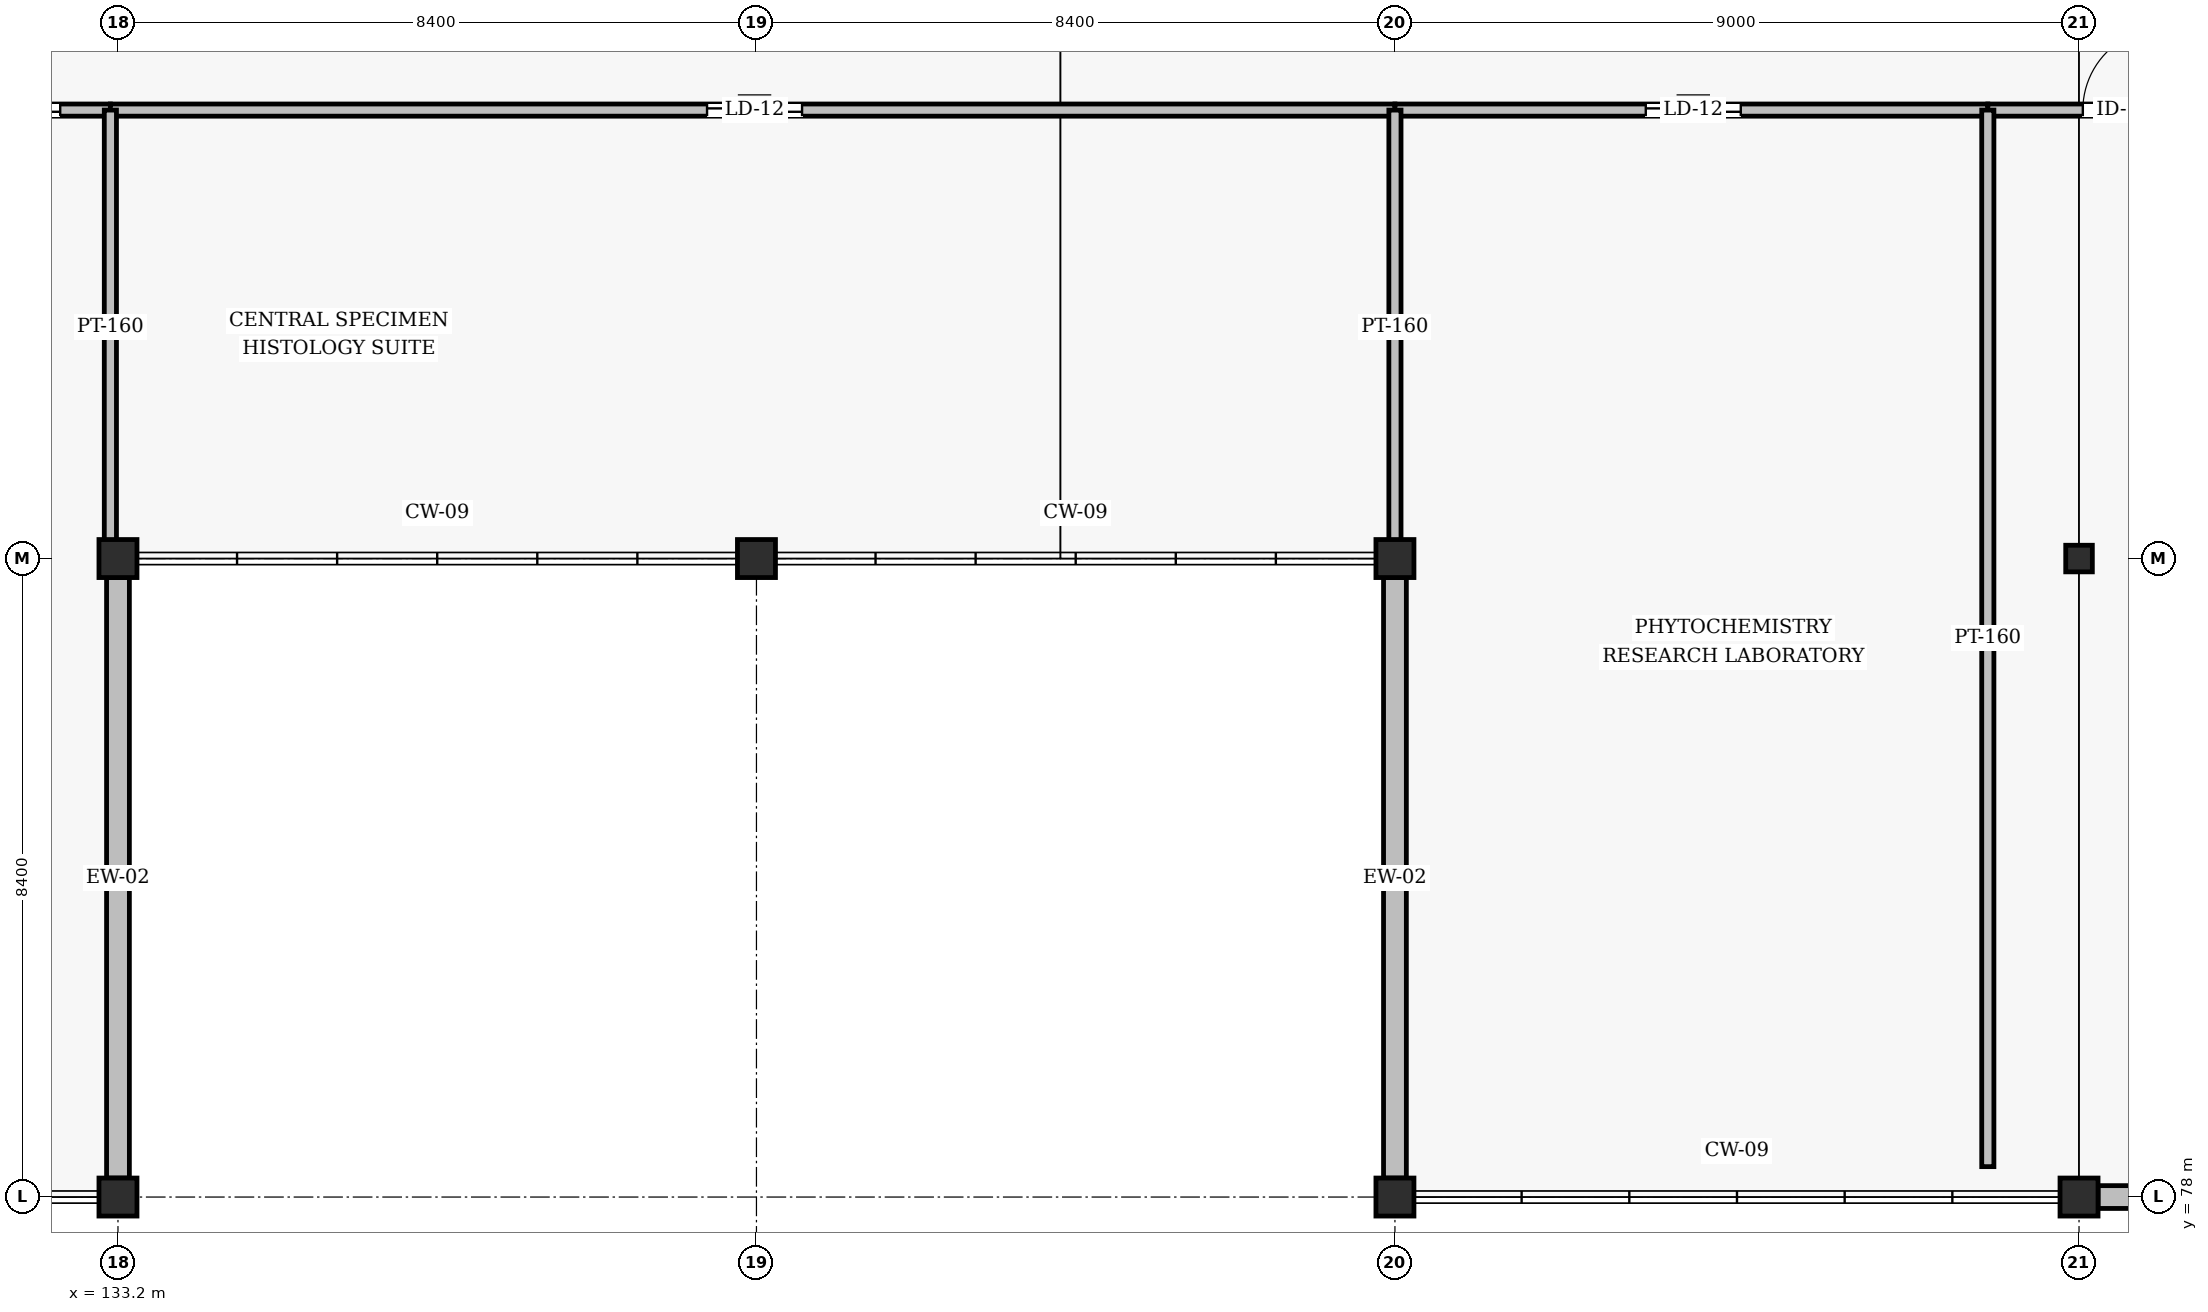
"""IFC4 building model, lengths in metres.
Left out: names, types, materials, properties, quantities, classifications, styles, units other than length and angle.
Written with IfcOpenShell. Run it as: python <this file> out.ifc"""

import sys

from ifc_helpers import new_model, si_unit, direction, frame, frame_2d, origin, origin_2d, place, context, subcontext, project, spatial, rectangle, hollow_rectangle, i_section, extrude, element, fill, save


model = new_model("IFC4")
c1 = context("Model", 3, precision=1e-05, world=origin(), true_north=direction((0.0, 1.0)))
c2 = subcontext(c1, "Body", "Model", "MODEL_VIEW")
j1 = project(units=[si_unit("LENGTHUNIT", "METRE"), si_unit("PLANEANGLEUNIT", "RADIAN")], contexts=[c1])
p1 = place(None, origin())
s1 = spatial("IfcSite", under=j1, at=p1, CompositionType="ELEMENT")
p2 = place(p1, origin())
s2 = spatial("IfcBuilding", under=s1, at=p2, CompositionType="ELEMENT")
p3 = place(p2, frame((0.0, 0.0, 31.8)))
s3 = spatial("IfcBuildingStorey", under=s2, at=p3, CompositionType="ELEMENT", Elevation=31.8)
p4 = place(p3, frame((133.2, 78.0, 0.0), z_axis=(0.0, 0.0, 1.0), x_axis=(1.0, 0.0, 0.0)))
e1 = element("IfcColumn", 1, at=p4, inside=s3, PredefinedType="COLUMN", context=c2, shape_type="SweptSolid", body=[
    extrude(hollow_rectangle(XDim=0.5, YDim=0.5, WallThickness=0.02, InnerFilletRadius=0.02, OuterFilletRadius=0.04, at=origin_2d()), origin(), (0.0, 0.0, 1.0), 3.576),
])
for number, where, z_axis, x_axis in (
    (2, (133.2, 86.4, 0.0), (0.0, 0.0, 1.0), (1.0, 0.0, 0.0)),
    (3, (141.6, 86.4, 0.0), (0.0, 0.0, 1.0), (1.0, 0.0, 0.0)),
):
    element("IfcColumn", number, at=place(p3, frame(where, z_axis=z_axis, x_axis=x_axis)), inside=s3, PredefinedType="COLUMN", context=c2, shape_type="SweptSolid", body=[
        extrude(hollow_rectangle(XDim=0.5, YDim=0.5, WallThickness=0.02, InnerFilletRadius=0.02, OuterFilletRadius=0.04, at=origin_2d()), origin(), (0.0, 0.0, 1.0), 3.6),
    ])
p5 = place(p3, frame((150.0, 78.0, 0.0), z_axis=(0.0, 0.0, 1.0), x_axis=(1.0, 0.0, 0.0)))
e4 = element("IfcColumn", 4, at=p5, inside=s3, PredefinedType="COLUMN", context=c2, shape_type="SweptSolid", body=[
    extrude(hollow_rectangle(XDim=0.5, YDim=0.5, WallThickness=0.02, InnerFilletRadius=0.02, OuterFilletRadius=0.04, at=origin_2d()), origin(), (0.0, 0.0, 1.0), 3.576),
])
p6 = place(p3, frame((150.0, 86.4, 0.0), z_axis=(0.0, 0.0, 1.0), x_axis=(1.0, 0.0, 0.0)))
e5 = element("IfcColumn", 5, at=p6, inside=s3, PredefinedType="COLUMN", context=c2, shape_type="SweptSolid", body=[
    extrude(hollow_rectangle(XDim=0.5, YDim=0.5, WallThickness=0.02, InnerFilletRadius=0.02, OuterFilletRadius=0.04, at=origin_2d()), origin(), (0.0, 0.0, 1.0), 3.6),
])
p7 = place(p3, frame((159.0, 78.0, 0.0), z_axis=(0.0, 0.0, 1.0), x_axis=(1.0, 0.0, 0.0)))
e6 = element("IfcColumn", 6, at=p7, inside=s3, PredefinedType="COLUMN", context=c2, shape_type="SweptSolid", body=[
    extrude(hollow_rectangle(XDim=0.5, YDim=0.5, WallThickness=0.02, InnerFilletRadius=0.02, OuterFilletRadius=0.04, at=origin_2d()), origin(), (0.0, 0.0, 1.0), 3.576),
])
p8 = place(p3, frame((159.0, 86.4, 0.0), z_axis=(0.0, 0.0, 1.0), x_axis=(1.0, 0.0, 0.0)))
e7 = element("IfcColumn", 7, at=p8, inside=s3, PredefinedType="COLUMN", context=c2, shape_type="SweptSolid", body=[
    extrude(i_section(OverallWidth=0.35, OverallDepth=0.35, WebThickness=0.012, FlangeThickness=0.019, FilletRadius=0.02, at=origin_2d()), origin(), (0.0, 0.0, 1.0), 3.6),
])
p9 = place(p3, frame((133.2, 78.25, 0.0), z_axis=(0.0, 0.0, 1.0), x_axis=(0.0, 1.0, 0.0)))
e8 = element("IfcWall", 8, at=p9, inside=s3, PredefinedType="SOLIDWALL", context=c2, shape_type="SweptSolid", body=[
    extrude(rectangle(XDim=7.9, YDim=0.3, at=frame_2d((3.95, 0.0))), origin(), (0.0, 0.0, 1.0), 2.795),
])
p10 = place(p3, frame((150.0, 86.15, 0.0), z_axis=(0.0, 0.0, 1.0), x_axis=(0.0, -1.0, 0.0)))
e9 = element("IfcWall", 9, at=p10, inside=s3, PredefinedType="SOLIDWALL", context=c2, shape_type="SweptSolid", body=[
    extrude(rectangle(XDim=7.9, YDim=0.3, at=frame_2d((3.95, 0.0))), origin(), (0.0, 0.0, 1.0), 2.095),
])
p11 = place(p3, frame((159.25, 78.0, 0.0), z_axis=(0.0, 0.0, 1.0), x_axis=(1.0, 0.0, 0.0)))
e10 = element("IfcWall", 10, at=p11, inside=s3, PredefinedType="SOLIDWALL", context=c2, shape_type="SweptSolid", body=[
    extrude(rectangle(XDim=8.5, YDim=0.3, at=frame_2d((4.25, 0.0))), origin(), (0.0, 0.0, 1.0), 3.295),
])
p12 = place(p11, frame((2.083, 0.0, 0.85)))
e11 = element("IfcOpeningElement", 11, at=p12, cuts=e10, PredefinedType="OPENING", context=c2, shape_type="SweptSolid", body=[
    extrude(rectangle(XDim=1.5, YDim=2.1, at=frame_2d((0.75, 1.05))), frame((0.0, 0.16, 0.0), z_axis=(0.0, -1.0, 0.0), x_axis=(1.0, 0.0, 0.0)), (0.0, 0.0, 1.0), 0.32),
])
p13 = place(p11, frame((4.917, 0.0, 0.85)))
e12 = element("IfcOpeningElement", 12, at=p13, cuts=e10, PredefinedType="OPENING", context=c2, shape_type="SweptSolid", body=[
    extrude(rectangle(XDim=1.5, YDim=2.1, at=frame_2d((0.75, 1.05))), frame((0.0, 0.16, 0.0), z_axis=(0.0, -1.0, 0.0), x_axis=(1.0, 0.0, 0.0)), (0.0, 0.0, 1.0), 0.32),
])
p14 = place(p3, frame((130.6, 92.3, 0.0), z_axis=(0.0, 0.0, 1.0), x_axis=(1.0, 0.0, 0.0)))
e13 = element("IfcWall", 13, at=p14, inside=s3, PredefinedType="PARTITIONING", context=c2, shape_type="SweptSolid", body=[
    extrude(rectangle(XDim=2.5, YDim=0.16, at=frame_2d((1.25, 0.0))), origin(), (0.0, 0.0, 1.0), 3.295),
])
p15 = place(p14, frame((0.7, 0.0, 0.0)))
e14 = element("IfcOpeningElement", 14, at=p15, cuts=e13, PredefinedType="OPENING", context=c2, shape_type="SweptSolid", body=[
    extrude(rectangle(XDim=1.14, YDim=2.12, at=frame_2d((0.57, 1.06))), frame((0.0, 0.09, 0.0), z_axis=(0.0, -1.0, 0.0), x_axis=(1.0, 0.0, 0.0)), (0.0, 0.0, 1.0), 0.18),
])
p16 = place(p3, frame((133.1, 92.3, 0.0), z_axis=(0.0, 0.0, 1.0), x_axis=(1.0, 0.0, 0.0)))
e15 = element("IfcWall", 15, at=p16, inside=s3, PredefinedType="PARTITIONING", context=c2, shape_type="SweptSolid", body=[
    extrude(rectangle(XDim=16.9, YDim=0.16, at=frame_2d((8.45, 0.0))), origin(), (0.0, 0.0, 1.0), 2.795),
])
p17 = place(p16, frame((7.85, 0.0, 0.0)))
e16 = element("IfcOpeningElement", 16, at=p17, cuts=e15, PredefinedType="OPENING", context=c2, shape_type="SweptSolid", body=[
    extrude(rectangle(XDim=1.25, YDim=2.12, at=frame_2d((0.625, 1.06))), frame((0.0, 0.09, 0.0), z_axis=(0.0, -1.0, 0.0), x_axis=(1.0, 0.0, 0.0)), (0.0, 0.0, 1.0), 0.18),
])
p18 = place(p3, frame((150.0, 92.3, 0.0), z_axis=(0.0, 0.0, 1.0), x_axis=(1.0, 0.0, 0.0)))
e17 = element("IfcWall", 17, at=p18, inside=s3, PredefinedType="PARTITIONING", context=c2, shape_type="SweptSolid", body=[
    extrude(rectangle(XDim=7.8, YDim=0.16, at=frame_2d((3.9, 0.0))), origin(), (0.0, 0.0, 1.0), 3.295),
])
p19 = place(p18, frame((3.3, 0.0, 0.0)))
e18 = element("IfcOpeningElement", 18, at=p19, cuts=e17, PredefinedType="OPENING", context=c2, shape_type="SweptSolid", body=[
    extrude(rectangle(XDim=1.25, YDim=2.12, at=frame_2d((0.625, 1.06))), frame((0.0, 0.09, 0.0), z_axis=(0.0, -1.0, 0.0), x_axis=(1.0, 0.0, 0.0)), (0.0, 0.0, 1.0), 0.18),
])
p20 = place(p3, frame((157.8, 92.3, 0.0), z_axis=(0.0, 0.0, 1.0), x_axis=(1.0, 0.0, 0.0)))
e19 = element("IfcWall", 19, at=p20, inside=s3, PredefinedType="PARTITIONING", context=c2, shape_type="SweptSolid", body=[
    extrude(rectangle(XDim=3.6, YDim=0.16, at=frame_2d((1.8, 0.0))), origin(), (0.0, 0.0, 1.0), 2.795),
])
p21 = place(p20, frame((1.25, 0.0, 0.0)))
e20 = element("IfcOpeningElement", 20, at=p21, cuts=e19, PredefinedType="OPENING", context=c2, shape_type="SweptSolid", body=[
    extrude(rectangle(XDim=1.08, YDim=2.08, at=frame_2d((0.54, 1.04))), frame((0.0, 0.09, 0.0), z_axis=(0.0, -1.0, 0.0), x_axis=(1.0, 0.0, 0.0)), (0.0, 0.0, 1.0), 0.18),
])
for number, where, z_axis, x_axis in (
    (21, (133.1, 86.6, 0.0), (0.0, 0.0, 1.0), (0.0, 1.0, 0.0)),
    (22, (150.0, 86.6, 0.0), (0.0, 0.0, 1.0), (0.0, 1.0, 0.0)),
):
    element("IfcWall", number, at=place(p3, frame(where, z_axis=z_axis, x_axis=x_axis)), inside=s3, PredefinedType="PARTITIONING", context=c2, shape_type="SweptSolid", body=[
        extrude(rectangle(XDim=5.7, YDim=0.16, at=frame_2d((2.85, 0.0))), origin(), (0.0, 0.0, 1.0), 2.795),
    ])
p22 = place(p3, frame((157.8, 78.4, 0.0), z_axis=(0.0, 0.0, 1.0), x_axis=(0.0, 1.0, 0.0)))
e23 = element("IfcWall", 23, at=p22, inside=s3, PredefinedType="PARTITIONING", context=c2, shape_type="SweptSolid", body=[
    extrude(rectangle(XDim=13.9, YDim=0.16, at=frame_2d((6.95, 0.0))), origin(), (0.0, 0.0, 1.0), 2.503),
])
p23 = place(p15, origin())
e24 = element("IfcDoor", 24, at=p23, inside=s3, OperationType="SINGLE_SWING_RIGHT", PredefinedType="DOOR", context=c2, shape_type="SweptSolid", body=[
    extrude(rectangle(XDim=1.14, YDim=2.12, at=frame_2d((0.57, 1.06))), frame((0.0, 0.025, 0.0), z_axis=(0.0, -1.0, 0.0), x_axis=(1.0, 0.0, 0.0)), (0.0, 0.0, 1.0), 0.05),
])
fill(e14, e24)
p24 = place(p17, origin())
e25 = element("IfcDoor", 25, at=p24, inside=s3, OperationType="SINGLE_SWING_LEFT", PredefinedType="DOOR", context=c2, shape_type="SweptSolid", body=[
    extrude(rectangle(XDim=1.25, YDim=2.12, at=frame_2d((0.625, 1.06))), frame((0.0, 0.025, 0.0), z_axis=(0.0, -1.0, 0.0), x_axis=(1.0, 0.0, 0.0)), (0.0, 0.0, 1.0), 0.05),
])
fill(e16, e25)
p25 = place(p19, origin())
e26 = element("IfcDoor", 26, at=p25, inside=s3, OperationType="SINGLE_SWING_LEFT", PredefinedType="DOOR", context=c2, shape_type="SweptSolid", body=[
    extrude(rectangle(XDim=1.25, YDim=2.12, at=frame_2d((0.625, 1.06))), frame((0.0, 0.025, 0.0), z_axis=(0.0, -1.0, 0.0), x_axis=(1.0, 0.0, 0.0)), (0.0, 0.0, 1.0), 0.05),
])
fill(e18, e26)
p26 = place(p21, origin())
e27 = element("IfcDoor", 27, at=p26, inside=s3, OperationType="SINGLE_SWING_RIGHT", PredefinedType="DOOR", context=c2, shape_type="SweptSolid", body=[
    extrude(rectangle(XDim=1.08, YDim=2.08, at=frame_2d((0.54, 1.04))), frame((0.0, 0.025, 0.0), z_axis=(0.0, -1.0, 0.0), x_axis=(1.0, 0.0, 0.0)), (0.0, 0.0, 1.0), 0.05),
])
fill(e20, e27)
save(model, sys.argv[1])
